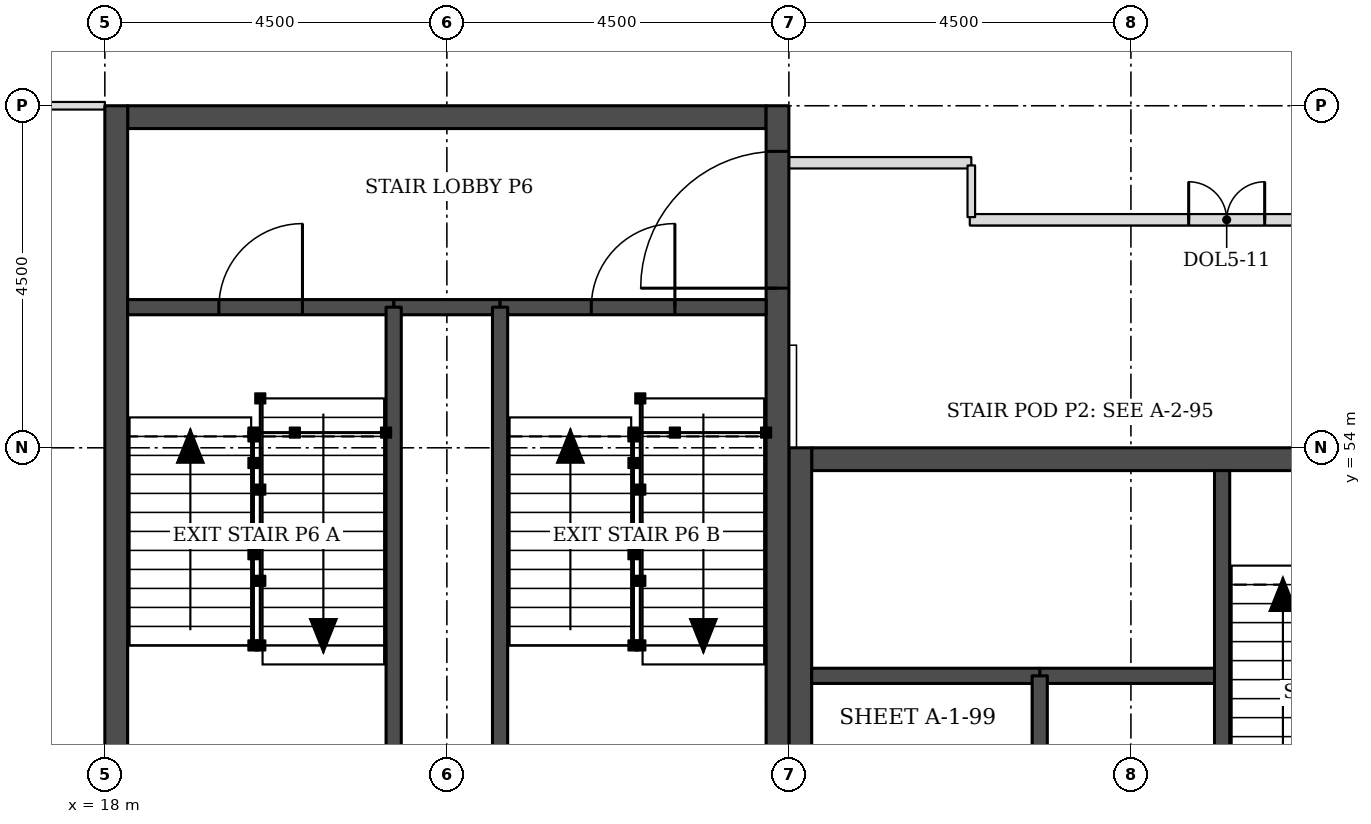
"""IFC4 building model, lengths in metres.
Left out: names, types, materials, properties, quantities, classifications, styles, units other than length and angle.
Written with IfcOpenShell. Run it as: python <this file> out.ifc"""

import sys

from ifc_helpers import new_model, si_unit, direction, frame, frame_2d, origin, place, context, subcontext, project, spatial, rectangle, extrude, element, fill, save


model = new_model("IFC4")
c1 = context("Model", 3, precision=1e-05, world=origin(), true_north=direction((0.0, 1.0)))
c2 = subcontext(c1, "Body", "Model", "MODEL_VIEW")
j1 = project(units=[si_unit("LENGTHUNIT", "METRE"), si_unit("PLANEANGLEUNIT", "RADIAN")], contexts=[c1])
p1 = place(None, origin())
s1 = spatial("IfcSite", under=j1, at=p1, CompositionType="ELEMENT")
p2 = place(p1, origin())
s2 = spatial("IfcBuilding", under=s1, at=p2, CompositionType="ELEMENT")
p3 = place(p2, frame((0.0, 0.0, 112.2)))
s3 = spatial("IfcBuildingStorey", under=s2, at=p3, CompositionType="ELEMENT", Elevation=112.2)
p4 = place(p3, frame((27.3, 53.85, 0.0), z_axis=(0.0, 0.0, 1.0), x_axis=(1.0, 0.0, 0.0)))
e1 = element("IfcWall", 1, at=p4, inside=s3, PredefinedType="SHEAR", context=c2, shape_type="SweptSolid", body=[
    extrude(rectangle(XDim=8.4, YDim=0.3, at=frame_2d((4.2, 0.0))), origin(), (0.0, 0.0, 1.0), 3.7),
])
p5 = place(p4, frame((6.4, 0.0, 0.0)))
e2 = element("IfcOpeningElement", 2, at=p5, cuts=e1, PredefinedType="OPENING", context=c2, shape_type="SweptSolid", body=[
    extrude(rectangle(XDim=1.1, YDim=2.1, at=frame_2d((0.55, 1.05))), frame((0.0, 0.16, 0.0), z_axis=(0.0, -1.0, 0.0), x_axis=(1.0, 0.0, 0.0)), (0.0, 0.0, 1.0), 0.32),
])
p6 = place(p3, frame((27.15, 45.0, 0.0), z_axis=(0.0, 0.0, 1.0), x_axis=(0.0, 1.0, 0.0)))
e3 = element("IfcWall", 3, at=p6, inside=s3, PredefinedType="SHEAR", context=c2, shape_type="SweptSolid", body=[
    extrude(rectangle(XDim=9.0, YDim=0.3, at=frame_2d((4.5, 0.0))), origin(), (0.0, 0.0, 1.0), 3.7),
])
p7 = place(p6, frame((0.4, 0.0, 0.0)))
e4 = element("IfcOpeningElement", 4, at=p7, cuts=e3, PredefinedType="OPENING", context=c2, shape_type="SweptSolid", body=[
    extrude(rectangle(XDim=1.1, YDim=2.1, at=frame_2d((0.55, 1.05))), frame((0.0, 0.16, 0.0), z_axis=(0.0, -1.0, 0.0), x_axis=(1.0, 0.0, 0.0)), (0.0, 0.0, 1.0), 0.32),
])
p8 = place(p3, frame((18.3, 58.35, 0.0), z_axis=(0.0, 0.0, 1.0), x_axis=(1.0, 0.0, 0.0)))
e5 = element("IfcWall", 5, at=p8, inside=s3, PredefinedType="SHEAR", context=c2, shape_type="SweptSolid", body=[
    extrude(rectangle(XDim=8.4, YDim=0.3, at=frame_2d((4.2, 0.0))), origin(), (0.0, 0.0, 1.0), 3.7),
])
p9 = place(p3, frame((18.15, 49.5, 0.0), z_axis=(0.0, 0.0, 1.0), x_axis=(0.0, 1.0, 0.0)))
e6 = element("IfcWall", 6, at=p9, inside=s3, PredefinedType="SHEAR", context=c2, shape_type="SweptSolid", body=[
    extrude(rectangle(XDim=9.0, YDim=0.3, at=frame_2d((4.5, 0.0))), origin(), (0.0, 0.0, 1.0), 3.7),
])
p10 = place(p3, frame((26.85, 49.5, 0.0), z_axis=(0.0, 0.0, 1.0), x_axis=(0.0, 1.0, 0.0)))
e7 = element("IfcWall", 7, at=p10, inside=s3, PredefinedType="SHEAR", context=c2, shape_type="SweptSolid", body=[
    extrude(rectangle(XDim=9.0, YDim=0.3, at=frame_2d((4.5, 0.0))), origin(), (0.0, 0.0, 1.0), 3.7),
])
p11 = place(p10, frame((6.6, 0.0, 0.0)))
e8 = element("IfcOpeningElement", 8, at=p11, cuts=e7, PredefinedType="OPENING", context=c2, shape_type="SweptSolid", body=[
    extrude(rectangle(XDim=1.8, YDim=2.1, at=frame_2d((0.9, 1.05))), frame((0.0, 0.16, 0.0), z_axis=(0.0, -1.0, 0.0), x_axis=(1.0, 0.0, 0.0)), (0.0, 0.0, 1.0), 0.32),
])
p12 = place(p3, frame((17.761, 63.751, 0.0), z_axis=(0.0, 0.0, 1.0), x_axis=(-0.707106781187, -0.707106781187, 0.0)))
e9 = element("IfcWall", 9, at=p12, inside=s3, PredefinedType="STANDARD", context=c2, shape_type="SweptSolid", body=[
    extrude(rectangle(XDim=7.089, YDim=0.35, at=frame_2d((3.544, 0.0))), origin(), (0.0, 0.0, 1.0), 3.525),
])
p13 = place(p12, frame((1.894, 0.0, 0.9)))
e10 = element("IfcOpeningElement", 10, at=p13, cuts=e9, PredefinedType="OPENING", context=c2, shape_type="SweptSolid", body=[
    extrude(rectangle(XDim=3.3, YDim=1.9, at=frame_2d((1.65, 0.95))), frame((0.0, 0.185, 0.0), z_axis=(0.0, -1.0, 0.0), x_axis=(1.0, 0.0, 0.0)), (0.0, 0.0, 1.0), 0.37),
])
p14 = place(p3, frame((29.38, 57.0, 0.0), z_axis=(0.0, 0.0, 1.0), x_axis=(1.0, 0.0, 0.0)))
e11 = element("IfcWall", 11, at=p14, inside=s3, PredefinedType="PARTITIONING", context=c2, shape_type="SweptSolid", body=[
    extrude(rectangle(XDim=6.62, YDim=0.15, at=frame_2d((3.31, 0.0))), origin(), (0.0, 0.0, 1.0), 3.55),
])
p15 = place(p14, frame((2.88, 0.0, 0.0)))
e12 = element("IfcOpeningElement", 12, at=p15, cuts=e11, PredefinedType="OPENING", context=c2, shape_type="SweptSolid", body=[
    extrude(rectangle(XDim=1.0, YDim=2.1, at=frame_2d((0.5, 1.05))), frame((0.0, 0.085, 0.0), z_axis=(0.0, -1.0, 0.0), x_axis=(1.0, 0.0, 0.0)), (0.0, 0.0, 1.0), 0.17),
])
p16 = place(p3, frame((13.5, 58.5, 0.0), z_axis=(0.0, 0.0, 1.0), x_axis=(1.0, 0.0, 0.0)))
e13 = element("IfcWall", 13, at=p16, inside=s3, PredefinedType="PARTITIONING", context=c2, shape_type="SweptSolid", body=[
    extrude(rectangle(XDim=4.5, YDim=0.1, at=frame_2d((2.25, 0.0))), origin(), (0.0, 0.0, 1.0), 2.55),
])
p17 = place(p16, frame((1.8, 0.0, 0.0)))
e14 = element("IfcOpeningElement", 14, at=p17, cuts=e13, PredefinedType="OPENING", context=c2, shape_type="SweptSolid", body=[
    extrude(rectangle(XDim=0.9, YDim=2.1, at=frame_2d((0.45, 1.05))), frame((0.0, 0.06, 0.0), z_axis=(0.0, -1.0, 0.0), x_axis=(1.0, 0.0, 0.0)), (0.0, 0.0, 1.0), 0.12),
])
p18 = place(p3, frame((27.0, 57.75, 0.0), z_axis=(0.0, 0.0, 1.0), x_axis=(1.0, 0.0, 0.0)))
e15 = element("IfcWall", 15, at=p18, inside=s3, PredefinedType="PARTITIONING", context=c2, shape_type="SweptSolid", body=[
    extrude(rectangle(XDim=2.4, YDim=0.15, at=frame_2d((1.2, 0.0))), origin(), (0.0, 0.0, 1.0), 3.55),
])
p19 = place(p3, frame((29.4, 57.715, 0.0), z_axis=(0.0, 0.0, 1.0), x_axis=(0.0, -1.0, 0.0)))
e16 = element("IfcWall", 16, at=p19, inside=s3, PredefinedType="PARTITIONING", context=c2, shape_type="SweptSolid", body=[
    extrude(rectangle(XDim=0.68, YDim=0.1, at=frame_2d((0.34, 0.0))), origin(), (0.0, 0.0, 1.0), 3.55),
])
p20 = place(p3, frame((30.3, 51.0, 0.0), z_axis=(0.0, 0.0, 1.0), x_axis=(1.0, 0.0, 0.0)))
e17 = element("IfcWall", 17, at=p20, inside=s3, PredefinedType="SOLIDWALL", context=c2, shape_type="SweptSolid", body=[
    extrude(rectangle(XDim=2.4, YDim=0.2, at=frame_2d((1.2, 0.0))), origin(), (0.0, 0.0, 1.0), 3.7),
])
p21 = place(p3, frame((27.3, 51.0, 0.0), z_axis=(0.0, 0.0, 1.0), x_axis=(1.0, 0.0, 0.0)))
e18 = element("IfcWall", 18, at=p21, inside=s3, PredefinedType="SOLIDWALL", context=c2, shape_type="SweptSolid", body=[
    extrude(rectangle(XDim=3.0, YDim=0.2, at=frame_2d((1.5, 0.0))), origin(), (0.0, 0.0, 1.0), 3.55),
])
for number, where, z_axis, x_axis in (
    (19, (30.3, 45.3, 0.0), (0.0, 0.0, 1.0), (0.0, 1.0, 0.0)),
    (20, (32.7, 48.0, 0.0), (0.0, 0.0, 1.0), (0.0, 1.0, 0.0)),
):
    element("IfcWall", number, at=place(p3, frame(where, z_axis=z_axis, x_axis=x_axis)), inside=s3, PredefinedType="SOLIDWALL", context=c2, shape_type="SweptSolid", body=[
        extrude(rectangle(XDim=5.7, YDim=0.2, at=frame_2d((2.85, 0.0))), origin(), (0.0, 0.0, 1.0), 3.55),
    ])
p22 = place(p3, frame((21.8, 55.85, 0.0), z_axis=(0.0, 0.0, 1.0), x_axis=(1.0, 0.0, 0.0)))
e21 = element("IfcWall", 21, at=p22, inside=s3, PredefinedType="SOLIDWALL", context=c2, shape_type="SweptSolid", body=[
    extrude(rectangle(XDim=1.4, YDim=0.2, at=frame_2d((0.7, 0.0))), origin(), (0.0, 0.0, 1.0), 3.55),
])
p23 = place(p3, frame((18.3, 55.85, 0.0), z_axis=(0.0, 0.0, 1.0), x_axis=(1.0, 0.0, 0.0)))
e22 = element("IfcWall", 22, at=p23, inside=s3, PredefinedType="SOLIDWALL", context=c2, shape_type="SweptSolid", body=[
    extrude(rectangle(XDim=3.5, YDim=0.2, at=frame_2d((1.75, 0.0))), origin(), (0.0, 0.0, 1.0), 3.55),
])
p24 = place(p23, frame((1.2, 0.0, 0.0)))
e23 = element("IfcOpeningElement", 23, at=p24, cuts=e22, PredefinedType="OPENING", context=c2, shape_type="SweptSolid", body=[
    extrude(rectangle(XDim=1.1, YDim=2.1, at=frame_2d((0.55, 1.05))), frame((0.0, 0.11, 0.0), z_axis=(0.0, -1.0, 0.0), x_axis=(1.0, 0.0, 0.0)), (0.0, 0.0, 1.0), 0.22),
])
p25 = place(p3, frame((23.2, 55.85, 0.0), z_axis=(0.0, 0.0, 1.0), x_axis=(1.0, 0.0, 0.0)))
e24 = element("IfcWall", 24, at=p25, inside=s3, PredefinedType="SOLIDWALL", context=c2, shape_type="SweptSolid", body=[
    extrude(rectangle(XDim=3.5, YDim=0.2, at=frame_2d((1.75, 0.0))), origin(), (0.0, 0.0, 1.0), 3.55),
])
p26 = place(p25, frame((1.2, 0.0, 0.0)))
e25 = element("IfcOpeningElement", 25, at=p26, cuts=e24, PredefinedType="OPENING", context=c2, shape_type="SweptSolid", body=[
    extrude(rectangle(XDim=1.1, YDim=2.1, at=frame_2d((0.55, 1.05))), frame((0.0, 0.11, 0.0), z_axis=(0.0, -1.0, 0.0), x_axis=(1.0, 0.0, 0.0)), (0.0, 0.0, 1.0), 0.22),
])
for number, where, z_axis, x_axis in (
    (26, (21.8, 49.8, 0.0), (0.0, 0.0, 1.0), (0.0, 1.0, 0.0)),
    (27, (23.2, 49.8, 0.0), (0.0, 0.0, 1.0), (0.0, 1.0, 0.0)),
):
    element("IfcWall", number, at=place(p3, frame(where, z_axis=z_axis, x_axis=x_axis)), inside=s3, PredefinedType="SOLIDWALL", context=c2, shape_type="SweptSolid", body=[
        extrude(rectangle(XDim=6.05, YDim=0.2, at=frame_2d((3.025, 0.0))), origin(), (0.0, 0.0, 1.0), 3.55),
    ])
p27 = place(p15, origin())
e28 = element("IfcDoor", 28, at=p27, inside=s3, OperationType="DOUBLE_DOOR_SINGLE_SWING", PredefinedType="DOOR", context=c2, shape_type="SweptSolid", body=[
    extrude(rectangle(XDim=1.0, YDim=2.1, at=frame_2d((0.5, 1.05))), frame((0.0, 0.025, 0.0), z_axis=(0.0, -1.0, 0.0), x_axis=(1.0, 0.0, 0.0)), (0.0, 0.0, 1.0), 0.05),
])
fill(e12, e28)
p28 = place(p24, origin())
e29 = element("IfcDoor", 29, at=p28, inside=s3, OperationType="SINGLE_SWING_RIGHT", PredefinedType="DOOR", context=c2, shape_type="SweptSolid", body=[
    extrude(rectangle(XDim=1.1, YDim=2.1, at=frame_2d((0.55, 1.05))), frame((0.0, 0.025, 0.0), z_axis=(0.0, -1.0, 0.0), x_axis=(1.0, 0.0, 0.0)), (0.0, 0.0, 1.0), 0.05),
])
fill(e23, e29)
p29 = place(p26, origin())
e30 = element("IfcDoor", 30, at=p29, inside=s3, OperationType="SINGLE_SWING_RIGHT", PredefinedType="DOOR", context=c2, shape_type="SweptSolid", body=[
    extrude(rectangle(XDim=1.1, YDim=2.1, at=frame_2d((0.55, 1.05))), frame((0.0, 0.025, 0.0), z_axis=(0.0, -1.0, 0.0), x_axis=(1.0, 0.0, 0.0)), (0.0, 0.0, 1.0), 0.05),
])
fill(e25, e30)
p30 = place(p11, origin())
e31 = element("IfcDoor", 31, at=p30, inside=s3, OperationType="SINGLE_SWING_LEFT", PredefinedType="DOOR", context=c2, shape_type="SweptSolid", body=[
    extrude(rectangle(XDim=1.8, YDim=2.1, at=frame_2d((0.9, 1.05))), frame((0.0, 0.025, 0.0), z_axis=(0.0, -1.0, 0.0), x_axis=(1.0, 0.0, 0.0)), (0.0, 0.0, 1.0), 0.05),
])
fill(e8, e31)
save(model, sys.argv[1])
